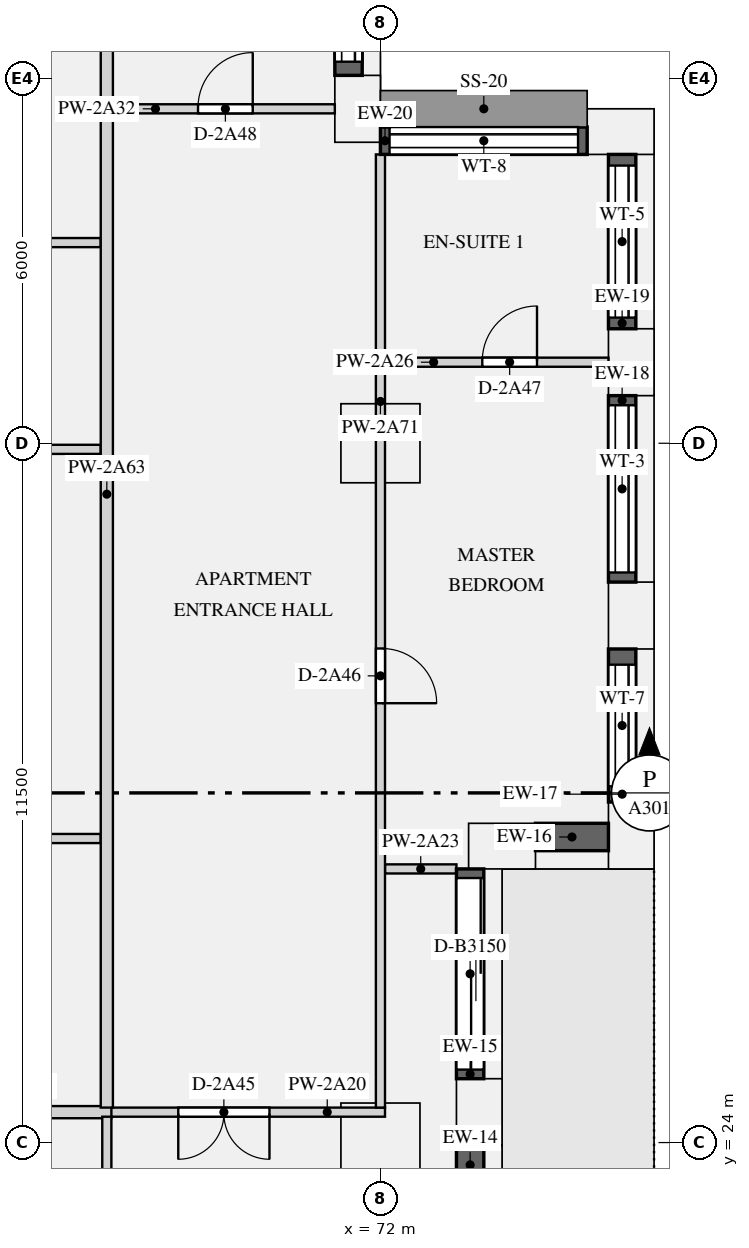
"""IFC4 building model, lengths in metres.
Left out: names, types, materials, properties, quantities, classifications, styles, units other than length and angle.
Written with IfcOpenShell. Run it as: python <this file> out.ifc"""

import sys

from ifc_helpers import new_model, si_unit, direction, frame, frame_2d, origin, origin_2d, place, context, subcontext, project, spatial, rectangle, extrude, element, fill, save


model = new_model("IFC4")
c1 = context("Model", 3, precision=1e-05, world=origin(), true_north=direction((0.0, 1.0)))
c2 = subcontext(c1, "Body", "Model", "MODEL_VIEW")
j1 = project(units=[si_unit("LENGTHUNIT", "METRE"), si_unit("PLANEANGLEUNIT", "RADIAN")], contexts=[c1])
p1 = place(None, origin())
s1 = spatial("IfcSite", under=j1, at=p1, CompositionType="ELEMENT")
p2 = place(p1, origin())
s2 = spatial("IfcBuilding", under=s1, at=p2, CompositionType="ELEMENT")
p3 = place(p2, frame((0.0, 0.0, 83.55)))
s3 = spatial("IfcBuildingStorey", under=s2, at=p3, CompositionType="ELEMENT", Elevation=83.55)
for number, where, z_axis, x_axis in (
    (1, (73.625, 24.5, 0.0), (0.0, 0.0, 1.0), (0.0, 1.0, 0.0)),
    (2, (74.0, 28.875, 0.0), (0.0, 0.0, 1.0), (1.0, 0.0, 0.0)),
    (3, (76.125, 29.05, 0.0), (0.0, 0.0, 1.0), (0.0, 1.0, 0.0)),
    (4, (76.125, 32.667, 0.0), (0.0, 0.0, 1.0), (0.0, 1.0, 0.0)),
    (5, (76.125, 36.833, 0.0), (0.0, 0.0, 1.0), (0.0, 1.0, 0.0)),
    (6, (75.95, 40.625, 0.0), (0.0, 0.0, 1.0), (-1.0, 0.0, 0.0)),
    (7, (71.625, 41.0, 0.0), (0.0, 0.0, 1.0), (0.0, 1.0, 0.0)),
):
    element("IfcColumn", number, at=place(p3, frame(where, z_axis=z_axis, x_axis=x_axis)), inside=s3, PredefinedType="USERDEFINED", context=c2, shape_type="SweptSolid", body=[
        extrude(rectangle(XDim=1.1, YDim=0.75, at=origin_2d()), origin(), (0.0, 0.0, 1.0), 3.15),
    ])
for number, where, z_axis, x_axis in (
    (8, (72.0, 24.0, 0.0), (0.0, 0.0, 1.0), (1.0, 0.0, 0.0)),
    (9, (72.0, 35.5, 0.0), (0.0, 0.0, 1.0), (1.0, 0.0, 0.0)),
):
    element("IfcColumn", number, at=place(p3, frame(where, z_axis=z_axis, x_axis=x_axis)), inside=s3, PredefinedType="COLUMN", context=c2, shape_type="SweptSolid", body=[
        extrude(rectangle(XDim=1.3, YDim=1.3, at=origin_2d()), origin(), (0.0, 0.0, 1.0), 3.15),
    ])
p4 = place(p3, frame((73.475, 21.05, 0.0), z_axis=(0.0, 0.0, 1.0), x_axis=(0.0, 1.0, 0.0)))
e10 = element("IfcWall", 10, at=p4, inside=s3, PredefinedType="SOLIDWALL", context=c2, shape_type="SweptSolid", body=[
    extrude(rectangle(XDim=2.9, YDim=0.45, at=frame_2d((1.45, 0.0))), origin(), (0.0, 0.0, 1.0), 2.83),
])
p5 = place(p4, frame((0.165, 0.0, 0.0)))
e11 = element("IfcOpeningElement", 11, at=p5, cuts=e10, PredefinedType="OPENING", context=c2, shape_type="SweptSolid", body=[
    extrude(rectangle(XDim=2.1, YDim=2.3, at=frame_2d((1.05, 1.15))), frame((0.0, 0.235, 0.0), z_axis=(0.0, -1.0, 0.0), x_axis=(1.0, 0.0, 0.0)), (0.0, 0.0, 1.0), 0.47),
])
p6 = place(p3, frame((73.475, 25.05, 0.0), z_axis=(0.0, 0.0, 1.0), x_axis=(0.0, 1.0, 0.0)))
e12 = element("IfcWall", 12, at=p6, inside=s3, PredefinedType="SOLIDWALL", context=c2, shape_type="SweptSolid", body=[
    extrude(rectangle(XDim=3.45, YDim=0.45, at=frame_2d((1.725, 0.0))), origin(), (0.0, 0.0, 1.0), 2.83),
])
p7 = place(p6, frame((0.15, 0.0, 0.0)))
e13 = element("IfcOpeningElement", 13, at=p7, cuts=e12, PredefinedType="OPENING", context=c2, shape_type="SweptSolid", body=[
    extrude(rectangle(XDim=3.15, YDim=2.3, at=frame_2d((1.575, 1.15))), frame((0.0, 0.235, 0.0), z_axis=(0.0, -1.0, 0.0), x_axis=(1.0, 0.0, 0.0)), (0.0, 0.0, 1.0), 0.47),
])
p8 = place(p3, frame((74.55, 29.025, 0.9), z_axis=(0.0, 0.0, 1.0), x_axis=(1.0, 0.0, 0.0)))
e14 = element("IfcWall", 14, at=p8, inside=s3, PredefinedType="SOLIDWALL", context=c2, shape_type="SweptSolid", body=[
    extrude(rectangle(XDim=1.2, YDim=0.45, at=frame_2d((0.6, 0.0))), origin(), (0.0, 0.0, 1.0), 1.93),
])
p9 = place(p3, frame((75.975, 29.6, 0.9), z_axis=(0.0, 0.0, 1.0), x_axis=(0.0, 1.0, 0.0)))
e15 = element("IfcWall", 15, at=p9, inside=s3, PredefinedType="SOLIDWALL", context=c2, shape_type="SweptSolid", body=[
    extrude(rectangle(XDim=2.517, YDim=0.45, at=frame_2d((1.258, 0.0))), origin(), (0.0, 0.0, 1.0), 1.93),
])
p10 = place(p9, frame((0.259, 0.0, 0.15)))
e16 = element("IfcOpeningElement", 16, at=p10, cuts=e15, PredefinedType="OPENING", context=c2, shape_type="SweptSolid", body=[
    extrude(rectangle(XDim=2.0, YDim=1.5, at=frame_2d((1.0, 0.75))), frame((0.0, 0.235, 0.0), z_axis=(0.0, -1.0, 0.0), x_axis=(1.0, 0.0, 0.0)), (0.0, 0.0, 1.0), 0.47),
])
p11 = place(p3, frame((75.975, 33.217, 0.9), z_axis=(0.0, 0.0, 1.0), x_axis=(0.0, 1.0, 0.0)))
e17 = element("IfcWall", 17, at=p11, inside=s3, PredefinedType="SOLIDWALL", context=c2, shape_type="SweptSolid", body=[
    extrude(rectangle(XDim=3.066, YDim=0.45, at=frame_2d((1.533, 0.0))), origin(), (0.0, 0.0, 1.0), 1.93),
])
p12 = place(p11, frame((0.158, 0.0, 0.15)))
e18 = element("IfcOpeningElement", 18, at=p12, cuts=e17, PredefinedType="OPENING", context=c2, shape_type="SweptSolid", body=[
    extrude(rectangle(XDim=2.75, YDim=1.5, at=frame_2d((1.375, 0.75))), frame((0.0, 0.235, 0.0), z_axis=(0.0, -1.0, 0.0), x_axis=(1.0, 0.0, 0.0)), (0.0, 0.0, 1.0), 0.47),
])
p13 = place(p3, frame((75.975, 37.383, 0.9), z_axis=(0.0, 0.0, 1.0), x_axis=(0.0, 1.0, 0.0)))
e19 = element("IfcWall", 19, at=p13, inside=s3, PredefinedType="SOLIDWALL", context=c2, shape_type="SweptSolid", body=[
    extrude(rectangle(XDim=2.867, YDim=0.45, at=frame_2d((1.434, 0.0))), origin(), (0.0, 0.0, 1.0), 1.93),
])
p14 = place(p13, frame((0.184, 0.0, 0.15)))
e20 = element("IfcOpeningElement", 20, at=p14, cuts=e19, PredefinedType="OPENING", context=c2, shape_type="SweptSolid", body=[
    extrude(rectangle(XDim=2.5, YDim=1.5, at=frame_2d((1.25, 0.75))), frame((0.0, 0.235, 0.0), z_axis=(0.0, -1.0, 0.0), x_axis=(1.0, 0.0, 0.0)), (0.0, 0.0, 1.0), 0.47),
])
p15 = place(p3, frame((75.4, 40.475, 0.9), z_axis=(0.0, 0.0, 1.0), x_axis=(-1.0, 0.0, 0.0)))
e21 = element("IfcWall", 21, at=p15, inside=s3, PredefinedType="SOLIDWALL", context=c2, shape_type="SweptSolid", body=[
    extrude(rectangle(XDim=3.4, YDim=0.45, at=frame_2d((1.7, 0.0))), origin(), (0.0, 0.0, 1.0), 1.93),
])
p16 = place(p15, frame((0.15, 0.0, 0.15)))
e22 = element("IfcOpeningElement", 22, at=p16, cuts=e21, PredefinedType="OPENING", context=c2, shape_type="SweptSolid", body=[
    extrude(rectangle(XDim=3.1, YDim=1.5, at=frame_2d((1.55, 0.75))), frame((0.0, 0.235, 0.0), z_axis=(0.0, -1.0, 0.0), x_axis=(1.0, 0.0, 0.0)), (0.0, 0.0, 1.0), 0.47),
])
p17 = place(p3, frame((71.475, 41.55, 0.9), z_axis=(0.0, 0.0, 1.0), x_axis=(0.0, 1.0, 0.0)))
e23 = element("IfcWall", 23, at=p17, inside=s3, PredefinedType="SOLIDWALL", context=c2, shape_type="SweptSolid", body=[
    extrude(rectangle(XDim=3.2, YDim=0.45, at=frame_2d((1.6, 0.0))), origin(), (0.0, 0.0, 1.0), 1.93),
])
p18 = place(p17, frame((0.225, 0.0, 0.15)))
e24 = element("IfcOpeningElement", 24, at=p18, cuts=e23, PredefinedType="OPENING", context=c2, shape_type="SweptSolid", body=[
    extrude(rectangle(XDim=2.75, YDim=1.5, at=frame_2d((1.375, 0.75))), frame((0.0, 0.235, 0.0), z_axis=(0.0, -1.0, 0.0), x_axis=(1.0, 0.0, 0.0)), (0.0, 0.0, 1.0), 0.47),
])
p19 = place(p3, frame((67.425, 24.5, 0.0), z_axis=(0.0, 0.0, 1.0), x_axis=(1.0, 0.0, 0.0)))
e25 = element("IfcWall", 25, at=p19, inside=s3, PredefinedType="PARTITIONING", context=c2, shape_type="SweptSolid", body=[
    extrude(rectangle(XDim=4.65, YDim=0.15, at=frame_2d((2.325, 0.0))), origin(), (0.0, 0.0, 1.0), 2.83),
])
p20 = place(p19, frame((1.25, 0.0, 0.0)))
e26 = element("IfcOpeningElement", 26, at=p20, cuts=e25, PredefinedType="OPENING", context=c2, shape_type="SweptSolid", body=[
    extrude(rectangle(XDim=1.5, YDim=2.1, at=frame_2d((0.75, 1.05))), frame((0.0, 0.085, 0.0), z_axis=(0.0, -1.0, 0.0), x_axis=(1.0, 0.0, 0.0)), (0.0, 0.0, 1.0), 0.17),
])
p21 = place(p3, frame((64.4, 24.5, 0.0), z_axis=(0.0, 0.0, 1.0), x_axis=(1.0, 0.0, 0.0)))
e27 = element("IfcWall", 27, at=p21, inside=s3, PredefinedType="PARTITIONING", context=c2, shape_type="SweptSolid", body=[
    extrude(rectangle(XDim=3.175, YDim=0.2, at=frame_2d((1.587, 0.0))), origin(), (0.0, 0.0, 1.0), 2.83),
])
p22 = place(p3, frame((72.075, 28.5, 0.0), z_axis=(0.0, 0.0, 1.0), x_axis=(1.0, 0.0, 0.0)))
e28 = element("IfcWall", 28, at=p22, inside=s3, PredefinedType="PARTITIONING", context=c2, shape_type="SweptSolid", body=[
    extrude(rectangle(XDim=1.175, YDim=0.15, at=frame_2d((0.587, 0.0))), origin(), (0.0, 0.0, 1.0), 2.83),
])
p23 = place(p3, frame((72.075, 36.833, 0.0), z_axis=(0.0, 0.0, 1.0), x_axis=(1.0, 0.0, 0.0)))
e29 = element("IfcWall", 29, at=p23, inside=s3, PredefinedType="PARTITIONING", context=c2, shape_type="SweptSolid", body=[
    extrude(rectangle(XDim=3.675, YDim=0.15, at=frame_2d((1.837, 0.0))), origin(), (0.0, 0.0, 1.0), 2.83),
])
p24 = place(p23, frame((1.6, 0.0, 0.0)))
e30 = element("IfcOpeningElement", 30, at=p24, cuts=e29, PredefinedType="OPENING", context=c2, shape_type="SweptSolid", body=[
    extrude(rectangle(XDim=0.9, YDim=2.1, at=frame_2d((0.45, 1.05))), frame((0.0, 0.085, 0.0), z_axis=(0.0, -1.0, 0.0), x_axis=(1.0, 0.0, 0.0)), (0.0, 0.0, 1.0), 0.17),
])
p25 = place(p3, frame((59.8, 35.4, 0.0), z_axis=(0.0, 0.0, 1.0), x_axis=(1.0, 0.0, 0.0)))
e31 = element("IfcWall", 31, at=p25, inside=s3, PredefinedType="PARTITIONING", context=c2, shape_type="SweptSolid", body=[
    extrude(rectangle(XDim=7.6, YDim=0.15, at=frame_2d((3.8, 0.0))), origin(), (0.0, 0.0, 1.0), 2.83),
])
p26 = place(p25, frame((5.025, 0.0, 0.0)))
e32 = element("IfcOpeningElement", 32, at=p26, cuts=e31, PredefinedType="OPENING", context=c2, shape_type="SweptSolid", body=[
    extrude(rectangle(XDim=1.5, YDim=2.1, at=frame_2d((0.75, 1.05))), frame((0.0, 0.085, 0.0), z_axis=(0.0, -1.0, 0.0), x_axis=(1.0, 0.0, 0.0)), (0.0, 0.0, 1.0), 0.17),
])
p27 = place(p3, frame((67.6, 41.0, 0.0), z_axis=(0.0, 0.0, 1.0), x_axis=(1.0, 0.0, 0.0)))
e33 = element("IfcWall", 33, at=p27, inside=s3, PredefinedType="PARTITIONING", context=c2, shape_type="SweptSolid", body=[
    extrude(rectangle(XDim=3.65, YDim=0.15, at=frame_2d((1.825, 0.0))), origin(), (0.0, 0.0, 1.0), 2.83),
])
p28 = place(p27, frame((1.4, 0.0, 0.0)))
e34 = element("IfcOpeningElement", 34, at=p28, cuts=e33, PredefinedType="OPENING", context=c2, shape_type="SweptSolid", body=[
    extrude(rectangle(XDim=0.9, YDim=2.1, at=frame_2d((0.45, 1.05))), frame((0.0, 0.085, 0.0), z_axis=(0.0, -1.0, 0.0), x_axis=(1.0, 0.0, 0.0)), (0.0, 0.0, 1.0), 0.17),
])
p29 = place(p3, frame((47.925, 38.8, 0.0), z_axis=(0.0, 0.0, 1.0), x_axis=(1.0, 0.0, 0.0)))
e35 = element("IfcWall", 35, at=p29, inside=s3, PredefinedType="PARTITIONING", context=c2, shape_type="SweptSolid", body=[
    extrude(rectangle(XDim=19.475, YDim=0.15, at=frame_2d((9.737, 0.0))), origin(), (0.0, 0.0, 1.0), 2.83),
])
p30 = place(p29, frame((3.375, 0.0, 0.0)))
e36 = element("IfcOpeningElement", 36, at=p30, cuts=e35, PredefinedType="OPENING", context=c2, shape_type="SweptSolid", body=[
    extrude(rectangle(XDim=0.9, YDim=2.1, at=frame_2d((0.45, 1.05))), frame((0.0, 0.085, 0.0), z_axis=(0.0, -1.0, 0.0), x_axis=(1.0, 0.0, 0.0)), (0.0, 0.0, 1.0), 0.17),
])
p31 = place(p29, frame((7.875, 0.0, 0.0)))
e37 = element("IfcOpeningElement", 37, at=p31, cuts=e35, PredefinedType="OPENING", context=c2, shape_type="SweptSolid", body=[
    extrude(rectangle(XDim=0.9, YDim=2.1, at=frame_2d((0.45, 1.05))), frame((0.0, 0.085, 0.0), z_axis=(0.0, -1.0, 0.0), x_axis=(1.0, 0.0, 0.0)), (0.0, 0.0, 1.0), 0.17),
])
p32 = place(p29, frame((16.875, 0.0, 0.0)))
e38 = element("IfcOpeningElement", 38, at=p32, cuts=e35, PredefinedType="OPENING", context=c2, shape_type="SweptSolid", body=[
    extrude(rectangle(XDim=0.9, YDim=2.1, at=frame_2d((0.45, 1.05))), frame((0.0, 0.085, 0.0), z_axis=(0.0, -1.0, 0.0), x_axis=(1.0, 0.0, 0.0)), (0.0, 0.0, 1.0), 0.17),
])
p33 = place(p3, frame((59.8, 29.0, 0.0), z_axis=(0.0, 0.0, 1.0), x_axis=(1.0, 0.0, 0.0)))
e39 = element("IfcWall", 39, at=p33, inside=s3, PredefinedType="PARTITIONING", context=c2, shape_type="SweptSolid", body=[
    extrude(rectangle(XDim=7.6, YDim=0.15, at=frame_2d((3.8, 0.0))), origin(), (0.0, 0.0, 1.0), 2.83),
])
p34 = place(p33, frame((1.9, 0.0, 0.0)))
e40 = element("IfcOpeningElement", 40, at=p34, cuts=e39, PredefinedType="OPENING", context=c2, shape_type="SweptSolid", body=[
    extrude(rectangle(XDim=0.9, YDim=2.1, at=frame_2d((0.45, 1.05))), frame((0.0, 0.085, 0.0), z_axis=(0.0, -1.0, 0.0), x_axis=(1.0, 0.0, 0.0)), (0.0, 0.0, 1.0), 0.17),
])
p35 = place(p3, frame((67.5, 16.575, 0.0), z_axis=(0.0, 0.0, 1.0), x_axis=(0.0, 1.0, 0.0)))
e41 = element("IfcWall", 41, at=p35, inside=s3, PredefinedType="PARTITIONING", context=c2, shape_type="SweptSolid", body=[
    extrude(rectangle(XDim=7.85, YDim=0.15, at=frame_2d((3.925, 0.0))), origin(), (0.0, 0.0, 1.0), 2.83),
])
p36 = place(p3, frame((67.5, 24.575, 0.0), z_axis=(0.0, 0.0, 1.0), x_axis=(0.0, 1.0, 0.0)))
e42 = element("IfcWall", 42, at=p36, inside=s3, PredefinedType="PARTITIONING", context=c2, shape_type="SweptSolid", body=[
    extrude(rectangle(XDim=20.175, YDim=0.2, at=frame_2d((10.087, 0.0))), origin(), (0.0, 0.0, 1.0), 2.83),
])
p37 = place(p3, frame((72.0, 24.575, 0.0), z_axis=(0.0, 0.0, 1.0), x_axis=(0.0, 1.0, 0.0)))
e43 = element("IfcWall", 43, at=p37, inside=s3, PredefinedType="PARTITIONING", context=c2, shape_type="SweptSolid", body=[
    extrude(rectangle(XDim=15.675, YDim=0.15, at=frame_2d((7.837, 0.0))), origin(), (0.0, 0.0, 1.0), 2.83),
])
p38 = place(p37, frame((6.65, 0.0, 0.0)))
e44 = element("IfcOpeningElement", 44, at=p38, cuts=e43, PredefinedType="OPENING", context=c2, shape_type="SweptSolid", body=[
    extrude(rectangle(XDim=0.9, YDim=2.1, at=frame_2d((0.45, 1.05))), frame((0.0, 0.085, 0.0), z_axis=(0.0, -1.0, 0.0), x_axis=(1.0, 0.0, 0.0)), (0.0, 0.0, 1.0), 0.17),
])
p39 = place(p7, origin())
e45 = element("IfcDoor", 45, at=p39, inside=s3, OperationType="SLIDING_TO_LEFT", PredefinedType="DOOR", context=c2, shape_type="SweptSolid", body=[
    extrude(rectangle(XDim=3.15, YDim=2.3, at=frame_2d((1.575, 1.15))), frame((0.0, -0.07, 0.0), z_axis=(0.0, -1.0, 0.0), x_axis=(1.0, 0.0, 0.0)), (0.0, 0.0, 1.0), 0.05),
])
fill(e13, e45)
p40 = place(p10, origin())
e46 = element("IfcWindow", 46, at=p40, inside=s3, PartitioningType="SINGLE_PANEL", PredefinedType="WINDOW", context=c2, shape_type="SweptSolid", body=[
    extrude(rectangle(XDim=2.0, YDim=1.5, at=frame_2d((1.0, 0.75))), frame((0.0, -0.065, 0.0), z_axis=(0.0, -1.0, 0.0), x_axis=(1.0, 0.0, 0.0)), (0.0, 0.0, 1.0), 0.06),
])
fill(e16, e46)
p41 = place(p12, origin())
e47 = element("IfcWindow", 47, at=p41, inside=s3, PartitioningType="SINGLE_PANEL", PredefinedType="WINDOW", context=c2, shape_type="SweptSolid", body=[
    extrude(rectangle(XDim=2.75, YDim=1.5, at=frame_2d((1.375, 0.75))), frame((0.0, -0.065, 0.0), z_axis=(0.0, -1.0, 0.0), x_axis=(1.0, 0.0, 0.0)), (0.0, 0.0, 1.0), 0.06),
])
fill(e18, e47)
p42 = place(p14, origin())
e48 = element("IfcWindow", 48, at=p42, inside=s3, PartitioningType="SINGLE_PANEL", PredefinedType="WINDOW", context=c2, shape_type="SweptSolid", body=[
    extrude(rectangle(XDim=2.5, YDim=1.5, at=frame_2d((1.25, 0.75))), frame((0.0, -0.065, 0.0), z_axis=(0.0, -1.0, 0.0), x_axis=(1.0, 0.0, 0.0)), (0.0, 0.0, 1.0), 0.06),
])
fill(e20, e48)
p43 = place(p16, origin())
e49 = element("IfcWindow", 49, at=p43, inside=s3, PartitioningType="SINGLE_PANEL", PredefinedType="WINDOW", context=c2, shape_type="SweptSolid", body=[
    extrude(rectangle(XDim=3.1, YDim=1.5, at=frame_2d((1.55, 0.75))), frame((0.0, -0.065, 0.0), z_axis=(0.0, -1.0, 0.0), x_axis=(1.0, 0.0, 0.0)), (0.0, 0.0, 1.0), 0.06),
])
fill(e22, e49)
p44 = place(p18, origin())
e50 = element("IfcWindow", 50, at=p44, inside=s3, PartitioningType="SINGLE_PANEL", PredefinedType="WINDOW", context=c2, shape_type="SweptSolid", body=[
    extrude(rectangle(XDim=2.75, YDim=1.5, at=frame_2d((1.375, 0.75))), frame((0.0, -0.065, 0.0), z_axis=(0.0, -1.0, 0.0), x_axis=(1.0, 0.0, 0.0)), (0.0, 0.0, 1.0), 0.06),
])
fill(e24, e50)
p45 = place(p20, frame((1.5, 0.0, 0.0), z_axis=(0.0, 0.0, 1.0), x_axis=(-1.0, 0.0, 0.0)))
e51 = element("IfcDoor", 51, at=p45, inside=s3, OperationType="DOUBLE_DOOR_SINGLE_SWING", PredefinedType="DOOR", context=c2, shape_type="SweptSolid", body=[
    extrude(rectangle(XDim=1.5, YDim=2.1, at=frame_2d((0.75, 1.05))), frame((0.0, 0.025, 0.0), z_axis=(0.0, -1.0, 0.0), x_axis=(1.0, 0.0, 0.0)), (0.0, 0.0, 1.0), 0.05),
])
fill(e26, e51)
p46 = place(p38, frame((0.9, 0.0, 0.0), z_axis=(0.0, 0.0, 1.0), x_axis=(-1.0, 0.0, 0.0)))
e52 = element("IfcDoor", 52, at=p46, inside=s3, OperationType="SINGLE_SWING_RIGHT", PredefinedType="DOOR", context=c2, shape_type="SweptSolid", body=[
    extrude(rectangle(XDim=0.9, YDim=2.1, at=frame_2d((0.45, 1.05))), frame((0.0, 0.025, 0.0), z_axis=(0.0, -1.0, 0.0), x_axis=(1.0, 0.0, 0.0)), (0.0, 0.0, 1.0), 0.05),
])
fill(e44, e52)
p47 = place(p24, origin())
e53 = element("IfcDoor", 53, at=p47, inside=s3, OperationType="SINGLE_SWING_RIGHT", PredefinedType="DOOR", context=c2, shape_type="SweptSolid", body=[
    extrude(rectangle(XDim=0.9, YDim=2.1, at=frame_2d((0.45, 1.05))), frame((0.0, 0.025, 0.0), z_axis=(0.0, -1.0, 0.0), x_axis=(1.0, 0.0, 0.0)), (0.0, 0.0, 1.0), 0.05),
])
fill(e30, e53)
p48 = place(p28, origin())
e54 = element("IfcDoor", 54, at=p48, inside=s3, OperationType="SINGLE_SWING_RIGHT", PredefinedType="DOOR", context=c2, shape_type="SweptSolid", body=[
    extrude(rectangle(XDim=0.9, YDim=2.1, at=frame_2d((0.45, 1.05))), frame((0.0, 0.025, 0.0), z_axis=(0.0, -1.0, 0.0), x_axis=(1.0, 0.0, 0.0)), (0.0, 0.0, 1.0), 0.05),
])
fill(e34, e54)
save(model, sys.argv[1])
